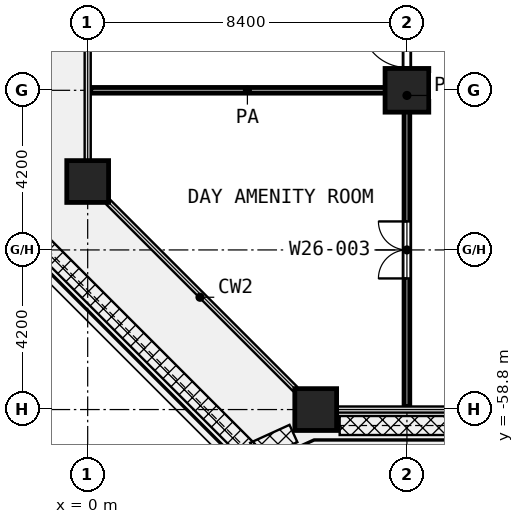
"""IFC4 building model, lengths in metres.
Left out: names, types, materials, properties, quantities, classifications, styles, units other than length and angle.
Written with IfcOpenShell. Run it as: python <this file> out.ifc"""

import sys

from ifc_helpers import new_model, si_unit, direction, frame, frame_2d, origin, origin_2d, place, context, subcontext, project, spatial, rectangle, extrude, element, fill, save


model = new_model("IFC4")
c1 = context("Model", 3, precision=1e-05, world=origin(), true_north=direction((0.0, 1.0)))
c2 = subcontext(c1, "Body", "Model", "MODEL_VIEW")
j1 = project(units=[si_unit("LENGTHUNIT", "METRE"), si_unit("PLANEANGLEUNIT", "RADIAN")], contexts=[c1])
p1 = place(None, origin())
s1 = spatial("IfcSite", under=j1, at=p1, CompositionType="ELEMENT")
p2 = place(p1, origin())
s2 = spatial("IfcBuilding", under=s1, at=p2, CompositionType="ELEMENT")
p3 = place(p2, frame((0.0, 0.0, 115.6)))
s3 = spatial("IfcBuildingStorey", under=s2, at=p3, CompositionType="ELEMENT", Elevation=115.6)
p4 = place(p3, frame((8.4, -50.4, 0.0), z_axis=(0.0, 0.0, 1.0), x_axis=(1.0, 0.0, 0.0)))
e1 = element("IfcColumn", 1, at=p4, inside=s3, PredefinedType="COLUMN", context=c2, shape_type="SweptSolid", body=[
    extrude(rectangle(XDim=1.15, YDim=1.15, at=origin_2d()), origin(), (0.0, 0.0, 1.0), 4.2),
])
for number, where, z_axis, x_axis in (
    (2, (0.0, -52.8, 0.0), (0.0, 0.0, 1.0), (1.0, 0.0, 0.0)),
    (3, (6.0, -58.8, 0.0), (0.0, 0.0, 1.0), (1.0, 0.0, 0.0)),
):
    element("IfcColumn", number, at=place(p3, frame(where, z_axis=z_axis, x_axis=x_axis)), inside=s3, PredefinedType="COLUMN", context=c2, shape_type="SweptSolid", body=[
        extrude(rectangle(XDim=1.1, YDim=1.1, at=origin_2d()), origin(), (0.0, 0.0, 1.0), 4.2),
    ])
p5 = place(p3, frame((0.08, -50.4, 0.0), z_axis=(0.0, 0.0, 1.0), x_axis=(1.0, 0.0, 0.0)))
e4 = element("IfcWall", 4, at=p5, inside=s3, PredefinedType="PARTITIONING", context=c2, shape_type="SweptSolid", body=[
    extrude(rectangle(XDim=8.245, YDim=0.15, at=frame_2d((4.123, 0.0))), origin(), (0.0, 0.0, 1.0), 3.6),
])
p6 = place(p3, frame((8.4, -58.72, 0.0), z_axis=(0.0, 0.0, 1.0), x_axis=(0.0, 1.0, 0.0)))
e5 = element("IfcWall", 5, at=p6, inside=s3, PredefinedType="PARTITIONING", context=c2, shape_type="SweptSolid", body=[
    extrude(rectangle(XDim=16.37, YDim=0.15, at=frame_2d((8.185, 0.0))), origin(), (0.0, 0.0, 1.0), 2.7),
])
p7 = place(p6, frame((8.92, 0.0, 0.0)))
e6 = element("IfcOpeningElement", 6, at=p7, cuts=e5, PredefinedType="OPENING", context=c2, shape_type="SweptSolid", body=[
    extrude(rectangle(XDim=1.2, YDim=2.1, at=frame_2d((0.6, 1.05))), frame((0.0, 0.085, 0.0), z_axis=(0.0, -1.0, 0.0), x_axis=(1.0, 0.0, 0.0)), (0.0, 0.0, 1.0), 0.17),
])
p8 = place(p6, frame((3.37, 0.0, 0.0)))
e7 = element("IfcOpeningElement", 7, at=p8, cuts=e5, PredefinedType="OPENING", context=c2, shape_type="SweptSolid", body=[
    extrude(rectangle(XDim=1.5, YDim=2.1, at=frame_2d((0.75, 1.05))), frame((0.0, 0.085, 0.0), z_axis=(0.0, -1.0, 0.0), x_axis=(1.0, 0.0, 0.0)), (0.0, 0.0, 1.0), 0.17),
])
p9 = place(p7, origin())
e8 = element("IfcDoor", 8, at=p9, inside=s3, OperationType="SINGLE_SWING_RIGHT", PredefinedType="DOOR", context=c2, shape_type="SweptSolid", body=[
    extrude(rectangle(XDim=1.2, YDim=2.1, at=frame_2d((0.6, 1.05))), frame((0.0, 0.025, 0.0), z_axis=(0.0, -1.0, 0.0), x_axis=(1.0, 0.0, 0.0)), (0.0, 0.0, 1.0), 0.05),
])
fill(e6, e8)
p10 = place(p8, origin())
e9 = element("IfcDoor", 9, at=p10, inside=s3, OperationType="DOUBLE_DOOR_SINGLE_SWING", PredefinedType="DOOR", context=c2, shape_type="SweptSolid", body=[
    extrude(rectangle(XDim=1.5, YDim=2.1, at=frame_2d((0.75, 1.05))), frame((0.0, 0.025, 0.0), z_axis=(0.0, -1.0, 0.0), x_axis=(1.0, 0.0, 0.0)), (0.0, 0.0, 1.0), 0.05),
])
fill(e7, e9)
save(model, sys.argv[1])
